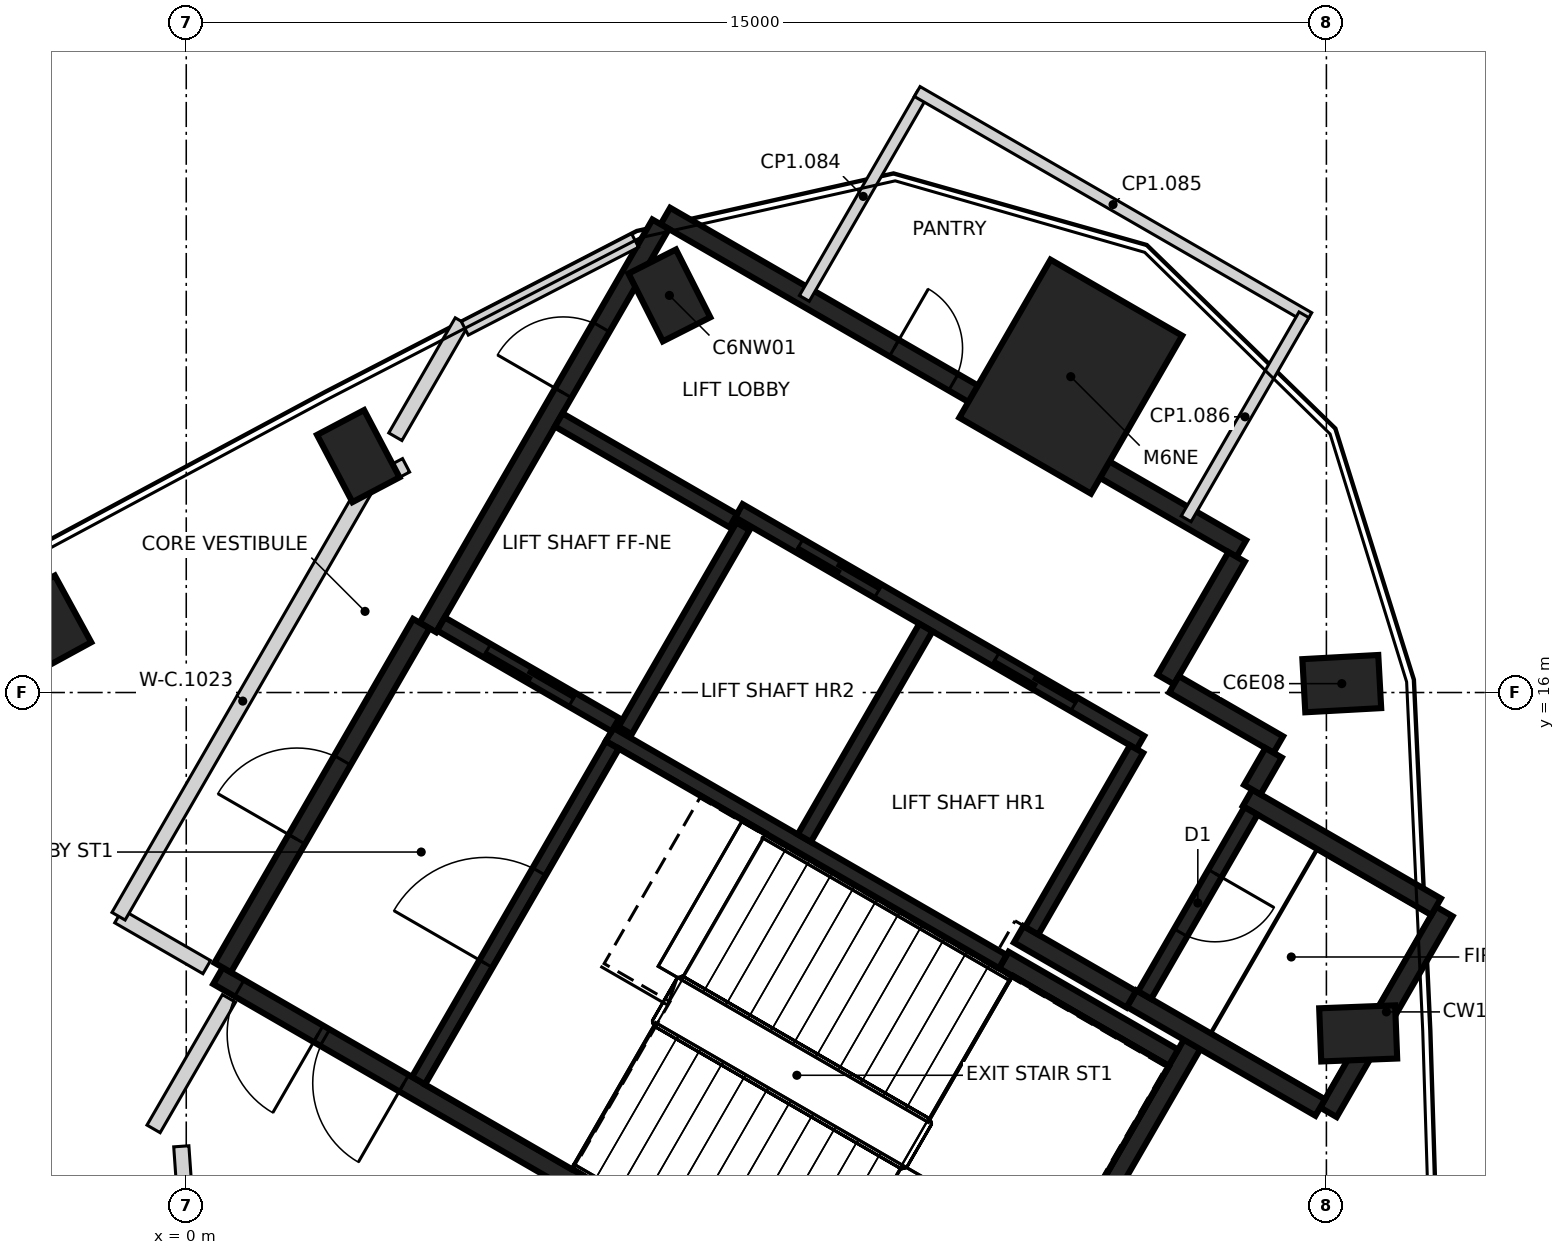
"""IFC4 building model, lengths in metres.
Left out: names, types, materials, properties, quantities, classifications, styles, units other than length and angle.
Written with IfcOpenShell. Run it as: python <this file> out.ifc"""

import sys

from ifc_helpers import new_model, si_unit, direction, frame, frame_2d, origin, origin_2d, place, context, subcontext, project, spatial, rectangle, extrude, element, fill, save


model = new_model("IFC4")
c1 = context("Model", 3, precision=1e-05, world=origin(), true_north=direction((0.0, 1.0)))
c2 = subcontext(c1, "Body", "Model", "MODEL_VIEW")
j1 = project(units=[si_unit("LENGTHUNIT", "METRE"), si_unit("PLANEANGLEUNIT", "RADIAN")], contexts=[c1])
p1 = place(None, origin())
s1 = spatial("IfcSite", under=j1, at=p1, CompositionType="ELEMENT")
p2 = place(p1, origin())
s2 = spatial("IfcBuilding", under=s1, at=p2, CompositionType="ELEMENT")
p3 = place(p2, frame((0.0, 0.0, 283.8)))
s3 = spatial("IfcBuildingStorey", under=s2, at=p3, CompositionType="ELEMENT", Elevation=283.8)
for number, where, z_axis, x_axis in (
    (1, (15.418, 11.515, -0.35), (0.0, 0.0, 1.0), (0.999, 0.039, 0.0)),
    (2, (15.202, 16.117, -0.35), (0.0, 0.0, 1.0), (0.998, 0.055, 0.0)),
    (3, (6.356, 21.224, -0.35), (0.0, 0.0, 1.0), (-0.452, 0.892, 0.0)),
    (4, (2.263, 19.11, -0.35), (0.0, 0.0, 1.0), (-0.466, 0.885, 0.0)),
    (5, (-1.797, 16.932, -0.35), (0.0, 0.0, 1.0), (-0.479, 0.878, 0.0)),
):
    element("IfcColumn", number, at=place(p3, frame(where, z_axis=z_axis, x_axis=x_axis)), inside=s3, PredefinedType="COLUMN", context=c2, shape_type="SweptSolid", body=[
        extrude(rectangle(XDim=1.0, YDim=0.7, at=origin_2d()), origin(), (0.0, 0.0, 1.0), 7.2),
    ])
p4 = place(p3, frame((11.637, 20.155, -0.35), z_axis=(0.0, 0.0, 1.0), x_axis=(0.5, 0.866025403784, 0.0)))
e6 = element("IfcColumn", 6, at=p4, inside=s3, PredefinedType="COLUMN", context=c2, shape_type="SweptSolid", body=[
    extrude(rectangle(XDim=2.4, YDim=2.0, at=origin_2d()), origin(), (0.0, 0.0, 1.0), 7.2),
])
p5 = place(p3, frame((10.42, 6.498, 0.0), z_axis=(0.0, 0.0, 1.0), x_axis=(-0.866021906294, 0.500006057782, 0.0)))
e7 = element("IfcWall", 7, at=p5, inside=s3, PredefinedType="SHEAR", context=c2, shape_type="SweptSolid", body=[
    extrude(rectangle(XDim=11.55, YDim=0.25, at=frame_2d((5.775, 0.0))), origin(), (0.0, 0.0, 1.0), 6.85),
])
p6 = place(p5, frame((10.025, 0.0, 0.0)))
e8 = element("IfcOpeningElement", 8, at=p6, cuts=e7, PredefinedType="OPENING", context=c2, shape_type="SweptSolid", body=[
    extrude(rectangle(XDim=1.2, YDim=2.1, at=frame_2d((0.6, 1.05))), frame((0.0, 0.135, 0.0), z_axis=(0.0, -1.0, 0.0), x_axis=(1.0, 0.0, 0.0)), (0.0, 0.0, 1.0), 0.27),
])
p7 = place(p5, frame((8.725, 0.0, 0.0)))
e9 = element("IfcOpeningElement", 9, at=p7, cuts=e7, PredefinedType="OPENING", context=c2, shape_type="SweptSolid", body=[
    extrude(rectangle(XDim=1.2, YDim=2.1, at=frame_2d((0.6, 1.05))), frame((0.0, 0.135, 0.0), z_axis=(0.0, -1.0, 0.0), x_axis=(1.0, 0.0, 0.0)), (0.0, 0.0, 1.0), 0.27),
])
p8 = place(p3, frame((6.304, 22.269, 0.0), z_axis=(0.0, 0.0, 1.0), x_axis=(0.866022959057, -0.500004234368, 0.0)))
e10 = element("IfcWall", 10, at=p8, inside=s3, PredefinedType="SHEAR", context=c2, shape_type="SweptSolid", body=[
    extrude(rectangle(XDim=8.75, YDim=0.25, at=frame_2d((4.375, 0.0))), origin(), (0.0, 0.0, 1.0), 6.85),
])
p9 = place(p8, frame((3.475, 0.0, 0.0)))
e11 = element("IfcOpeningElement", 11, at=p9, cuts=e10, PredefinedType="OPENING", context=c2, shape_type="SweptSolid", body=[
    extrude(rectangle(XDim=0.9, YDim=2.1, at=frame_2d((0.45, 1.05))), frame((0.0, 0.135, 0.0), z_axis=(0.0, -1.0, 0.0), x_axis=(1.0, 0.0, 0.0)), (0.0, 0.0, 1.0), 0.27),
])
p10 = place(p3, frame((3.179, 16.856, 0.0), z_axis=(0.0, 0.0, 1.0), x_axis=(0.500001955336, 0.866024274868, 0.0)))
e12 = element("IfcWall", 12, at=p10, inside=s3, PredefinedType="SHEAR", context=c2, shape_type="SweptSolid", body=[
    extrude(rectangle(XDim=6.125, YDim=0.25, at=frame_2d((3.062, 0.0))), origin(), (0.0, 0.0, 1.0), 6.85),
])
p11 = place(p10, frame((3.563, 0.0, 0.0)))
e13 = element("IfcOpeningElement", 13, at=p11, cuts=e12, PredefinedType="OPENING", context=c2, shape_type="SweptSolid", body=[
    extrude(rectangle(XDim=1.0, YDim=2.1, at=frame_2d((0.5, 1.05))), frame((0.0, 0.135, 0.0), z_axis=(0.0, -1.0, 0.0), x_axis=(1.0, 0.0, 0.0)), (0.0, 0.0, 1.0), 0.27),
])
p12 = place(p3, frame((0.48, 12.381, 0.0), z_axis=(0.0, 0.0, 1.0), x_axis=(0.49999885962, 0.866026062182, 0.0)))
e14 = element("IfcWall", 14, at=p12, inside=s3, PredefinedType="SHEAR", context=c2, shape_type="SweptSolid", body=[
    extrude(rectangle(XDim=5.225, YDim=0.25, at=frame_2d((2.612, 0.0))), origin(), (0.0, 0.0, 1.0), 6.85),
])
p13 = place(p12, frame((1.949, 0.0, 0.0)))
e15 = element("IfcOpeningElement", 15, at=p13, cuts=e14, PredefinedType="OPENING", context=c2, shape_type="SweptSolid", body=[
    extrude(rectangle(XDim=1.2, YDim=2.1, at=frame_2d((0.6, 1.05))), frame((0.0, 0.135, 0.0), z_axis=(0.0, -1.0, 0.0), x_axis=(1.0, 0.0, 0.0)), (0.0, 0.0, 1.0), 0.27),
])
p14 = place(p3, frame((13.238, 11.378, 0.0), z_axis=(0.0, 0.0, 1.0), x_axis=(-0.500008851346, -0.866020293397, 0.0)))
e16 = element("IfcWall", 16, at=p14, inside=s3, PredefinedType="SHEAR", context=c2, shape_type="SweptSolid", body=[
    extrude(rectangle(XDim=5.51, YDim=0.25, at=frame_2d((2.755, 0.0))), origin(), (0.0, 0.0, 1.0), 6.85),
])
p15 = place(p3, frame((16.552, 13.119, 0.0), z_axis=(0.0, 0.0, 1.0), x_axis=(-0.499978833458, -0.866037623948, 0.0)))
e17 = element("IfcWall", 17, at=p15, inside=s3, PredefinedType="SHEAR", context=c2, shape_type="SweptSolid", body=[
    extrude(rectangle(XDim=3.05, YDim=0.25, at=frame_2d((1.525, 0.0))), origin(), (0.0, 0.0, 1.0), 6.85),
])
p16 = place(p3, frame((14.918, 10.54, 0.0), z_axis=(0.0, 0.0, 1.0), x_axis=(-0.866063538972, 0.499933942099, 0.0)))
e18 = element("IfcWall", 18, at=p16, inside=s3, PredefinedType="SHEAR", context=c2, shape_type="SweptSolid", body=[
    extrude(rectangle(XDim=2.865, YDim=0.25, at=frame_2d((1.432, 0.0))), origin(), (0.0, 0.0, 1.0), 6.85),
])
p17 = place(p3, frame((13.963, 14.614, 0.0), z_axis=(0.0, 0.0, 1.0), x_axis=(0.866042235819, -0.499970844928, 0.0)))
e19 = element("IfcWall", 19, at=p17, inside=s3, PredefinedType="SHEAR", context=c2, shape_type="SweptSolid", body=[
    extrude(rectangle(XDim=2.865, YDim=0.25, at=frame_2d((1.432, 0.0))), origin(), (0.0, 0.0, 1.0), 6.85),
])
p18 = place(p3, frame((10.757, 12.481, 0.0), z_axis=(0.0, 0.0, 1.0), x_axis=(0.866022940537, -0.500004266446, 0.0)))
e20 = element("IfcWall", 20, at=p18, inside=s3, PredefinedType="SHEAR", context=c2, shape_type="SweptSolid", body=[
    extrude(rectangle(XDim=2.575, YDim=0.25, at=frame_2d((1.287, 0.0))), origin(), (0.0, 0.0, 1.0), 6.85),
])
p19 = place(p3, frame((13.819, 17.785, 0.0), z_axis=(0.0, 0.0, 1.0), x_axis=(-0.500039802285, -0.866002422705, 0.0)))
e21 = element("IfcWall", 21, at=p19, inside=s3, PredefinedType="SHEAR", context=c2, shape_type="SweptSolid", body=[
    extrude(rectangle(XDim=1.865, YDim=0.25, at=frame_2d((0.932, 0.0))), origin(), (0.0, 0.0, 1.0), 6.85),
])
p20 = place(p3, frame((12.433, 11.964, 0.0), z_axis=(0.0, 0.0, 1.0), x_axis=(-0.866038183914, 0.499977863513, 0.0)))
e22 = element("IfcWall", 22, at=p20, inside=s3, PredefinedType="SHEAR", context=c2, shape_type="SweptSolid", body=[
    extrude(rectangle(XDim=1.71, YDim=0.25, at=frame_2d((0.855, 0.0))), origin(), (0.0, 0.0, 1.0), 6.85),
])
p21 = place(p3, frame((12.995, 16.108, 0.0), z_axis=(0.0, 0.0, 1.0), x_axis=(0.866044474677, -0.49996696679, 0.0)))
e23 = element("IfcWall", 23, at=p21, inside=s3, PredefinedType="SHEAR", context=c2, shape_type="SweptSolid", body=[
    extrude(rectangle(XDim=1.584, YDim=0.25, at=frame_2d((0.792, 0.0))), origin(), (0.0, 0.0, 1.0), 6.85),
])
p22 = place(p3, frame((14.305, 15.207, 0.0), z_axis=(0.0, 0.0, 1.0), x_axis=(-0.499848422343, -0.866112899501, 0.0)))
e24 = element("IfcWall", 24, at=p22, inside=s3, PredefinedType="SHEAR", context=c2, shape_type="SweptSolid", body=[
    extrude(rectangle(XDim=0.559, YDim=0.25, at=frame_2d((0.28, 0.0))), origin(), (0.0, 0.0, 1.0), 6.85),
])
p23 = place(p3, frame((12.552, 15.342, 0.0), z_axis=(0.0, 0.0, 1.0), x_axis=(-0.866030299012, 0.499991521122, 0.0)))
e25 = element("IfcWall", 25, at=p23, inside=s3, PredefinedType="SHEAR", context=c2, shape_type="SweptSolid", body=[
    extrude(rectangle(XDim=6.1, YDim=0.2, at=frame_2d((3.05, 0.0))), origin(), (0.0, 0.0, 1.0), 6.85),
])
p24 = place(p23, frame((1.0, 0.0, 0.0)))
e26 = element("IfcOpeningElement", 26, at=p24, cuts=e25, PredefinedType="OPENING", context=c2, shape_type="SweptSolid", body=[
    extrude(rectangle(XDim=1.2, YDim=2.1, at=frame_2d((0.6, 1.05))), frame((0.0, 0.11, 0.0), z_axis=(0.0, -1.0, 0.0), x_axis=(1.0, 0.0, 0.0)), (0.0, 0.0, 1.0), 0.22),
])
p25 = place(p23, frame((3.982, 0.0, 0.0)))
e27 = element("IfcOpeningElement", 27, at=p25, cuts=e25, PredefinedType="OPENING", context=c2, shape_type="SweptSolid", body=[
    extrude(rectangle(XDim=1.2, YDim=2.1, at=frame_2d((0.6, 1.05))), frame((0.0, 0.11, 0.0), z_axis=(0.0, -1.0, 0.0), x_axis=(1.0, 0.0, 0.0)), (0.0, 0.0, 1.0), 0.22),
])
p26 = place(p3, frame((10.743, 12.46, 0.0), z_axis=(0.0, 0.0, 1.0), x_axis=(-0.866018848283, 0.500011354289, 0.0)))
e28 = element("IfcWall", 28, at=p26, inside=s3, PredefinedType="SHEAR", context=c2, shape_type="SweptSolid", body=[
    extrude(rectangle(XDim=5.974, YDim=0.2, at=frame_2d((2.987, 0.0))), origin(), (0.0, 0.0, 1.0), 6.85),
])
p27 = place(p3, frame((3.057, 10.895, 0.0), z_axis=(0.0, 0.0, 1.0), x_axis=(0.500027839223, 0.866009330205, 0.0)))
e29 = element("IfcWall", 29, at=p27, inside=s3, PredefinedType="SHEAR", context=c2, shape_type="SweptSolid", body=[
    extrude(rectangle(XDim=5.098, YDim=0.2, at=frame_2d((2.549, 0.0))), origin(), (0.0, 0.0, 1.0), 6.85),
])
p28 = place(p27, frame((1.774, 0.0, 0.0)))
e30 = element("IfcOpeningElement", 30, at=p28, cuts=e29, PredefinedType="OPENING", context=c2, shape_type="SweptSolid", body=[
    extrude(rectangle(XDim=1.4, YDim=2.1, at=frame_2d((0.7, 1.05))), frame((0.0, 0.11, 0.0), z_axis=(0.0, -1.0, 0.0), x_axis=(1.0, 0.0, 0.0)), (0.0, 0.0, 1.0), 0.22),
])
p29 = place(p3, frame((8.132, 14.084, 0.0), z_axis=(0.0, 0.0, 1.0), x_axis=(0.500030834389, 0.86600760081, 0.0)))
e31 = element("IfcWall", 31, at=p29, inside=s3, PredefinedType="SHEAR", context=c2, shape_type="SweptSolid", body=[
    extrude(rectangle(XDim=3.198, YDim=0.2, at=frame_2d((1.599, 0.0))), origin(), (0.0, 0.0, 1.0), 6.85),
])
p30 = place(p3, frame((14.008, 14.442, 0.0), z_axis=(0.0, 0.0, 1.0), x_axis=(-0.499986818241, -0.866033014143, 0.0)))
e32 = element("IfcWall", 32, at=p30, inside=s3, PredefinedType="SHEAR", context=c2, shape_type="SweptSolid", body=[
    extrude(rectangle(XDim=2.798, YDim=0.2, at=frame_2d((1.399, 0.0))), origin(), (0.0, 0.0, 1.0), 6.85),
])
p31 = place(p30, frame((0.949, 0.0, 0.0)))
e33 = element("IfcOpeningElement", 33, at=p31, cuts=e32, PredefinedType="OPENING", context=c2, shape_type="SweptSolid", body=[
    extrude(rectangle(XDim=0.9, YDim=2.1, at=frame_2d((0.45, 1.05))), frame((0.0, 0.11, 0.0), z_axis=(0.0, -1.0, 0.0), x_axis=(1.0, 0.0, 0.0)), (0.0, 0.0, 1.0), 0.22),
])
p32 = place(p3, frame((12.502, 15.255, 0.0), z_axis=(0.0, 0.0, 1.0), x_axis=(-0.499965018551, -0.866045599391, 0.0)))
e34 = element("IfcWall", 34, at=p32, inside=s3, PredefinedType="SHEAR", context=c2, shape_type="SweptSolid", body=[
    extrude(rectangle(XDim=2.759, YDim=0.2, at=frame_2d((1.379, 0.0))), origin(), (0.0, 0.0, 1.0), 6.85),
])
p33 = place(p3, frame((7.324, 18.187, 0.0), z_axis=(0.0, 0.0, 1.0), x_axis=(-0.499967891604, -0.866043940782, 0.0)))
e35 = element("IfcWall", 35, at=p33, inside=s3, PredefinedType="SHEAR", context=c2, shape_type="SweptSolid", body=[
    extrude(rectangle(XDim=3.1, YDim=0.2, at=frame_2d((1.55, 0.0))), origin(), (0.0, 0.0, 1.0), 6.85),
])
p34 = place(p3, frame((5.646, 15.576, 0.0), z_axis=(0.0, 0.0, 1.0), x_axis=(-0.866018407898, 0.500012117035, 0.0)))
e36 = element("IfcWall", 36, at=p34, inside=s3, PredefinedType="SHEAR", context=c2, shape_type="SweptSolid", body=[
    extrude(rectangle(XDim=2.651, YDim=0.2, at=frame_2d((1.325, 0.0))), origin(), (0.0, 0.0, 1.0), 6.85),
])
p35 = place(p34, frame((0.652, 0.0, 0.0)))
e37 = element("IfcOpeningElement", 37, at=p35, cuts=e36, PredefinedType="OPENING", context=c2, shape_type="SweptSolid", body=[
    extrude(rectangle(XDim=1.3, YDim=2.1, at=frame_2d((0.65, 1.05))), frame((0.0, 0.11, 0.0), z_axis=(0.0, -1.0, 0.0), x_axis=(1.0, 0.0, 0.0)), (0.0, 0.0, 1.0), 0.22),
])
p36 = place(p3, frame((7.196, 18.26, 0.0), z_axis=(0.0, 0.0, 1.0), x_axis=(-0.866018407898, 0.500012117035, 0.0)))
e38 = element("IfcWall", 38, at=p36, inside=s3, PredefinedType="SHEAR", context=c2, shape_type="SweptSolid", body=[
    extrude(rectangle(XDim=2.651, YDim=0.2, at=frame_2d((1.325, 0.0))), origin(), (0.0, 0.0, 1.0), 6.85),
])
p37 = place(p3, frame((8.132, 21.185, 0.0), z_axis=(0.0, 0.0, 1.0), x_axis=(0.49999285859, 0.86602952684, 0.0)))
e39 = element("IfcWall", 39, at=p37, inside=s3, PredefinedType="PARTITIONING", context=c2, shape_type="SweptSolid", body=[
    extrude(rectangle(XDim=3.1, YDim=0.15, at=frame_2d((1.55, 0.0))), origin(), (0.0, 0.0, 1.0), 6.85),
])
p38 = place(p3, frame((9.617, 23.907, 0.0), z_axis=(0.0, 0.0, 1.0), x_axis=(0.866045517703, -0.499965160052, 0.0)))
e40 = element("IfcWall", 40, at=p38, inside=s3, PredefinedType="PARTITIONING", context=c2, shape_type="SweptSolid", body=[
    extrude(rectangle(XDim=5.95, YDim=0.15, at=frame_2d((2.975, 0.0))), origin(), (0.0, 0.0, 1.0), 6.85),
])
p39 = place(p3, frame((14.705, 20.969, 0.0), z_axis=(0.0, 0.0, 1.0), x_axis=(-0.499967891604, -0.866043940782, 0.0)))
e41 = element("IfcWall", 41, at=p39, inside=s3, PredefinedType="PARTITIONING", context=c2, shape_type="SweptSolid", body=[
    extrude(rectangle(XDim=3.1, YDim=0.15, at=frame_2d((1.55, 0.0))), origin(), (0.0, 0.0, 1.0), 6.85),
])
p40 = place(p3, frame((-0.891, 13.057, 0.0), z_axis=(0.0, 0.0, 1.0), x_axis=(0.866082447003, -0.499901185229, 0.0)))
e42 = element("IfcWall", 42, at=p40, inside=s3, PredefinedType="PARTITIONING", context=c2, shape_type="SweptSolid", body=[
    extrude(rectangle(XDim=1.34, YDim=0.2, at=frame_2d((0.67, 0.0))), origin(), (0.0, 0.0, 1.0), 6.85),
])
p41 = place(p3, frame((-0.891, 13.057, 0.0), z_axis=(0.0, 0.0, 1.0), x_axis=(0.499999420379, 0.866025738428, 0.0)))
e43 = element("IfcWall", 43, at=p41, inside=s3, PredefinedType="PARTITIONING", context=c2, shape_type="SweptSolid", body=[
    extrude(rectangle(XDim=6.537, YDim=0.2, at=frame_2d((3.268, 0.0))), origin(), (0.0, 0.0, 1.0), 6.85),
])
p42 = place(p3, frame((-0.43, 10.259, 0.0), z_axis=(0.0, 0.0, 1.0), x_axis=(0.500429403118, 0.865777345797, 0.0)))
e44 = element("IfcWall", 44, at=p42, inside=s3, PredefinedType="PARTITIONING", context=c2, shape_type="SweptSolid", body=[
    extrude(rectangle(XDim=1.983, YDim=0.2, at=frame_2d((0.991, 0.0))), origin(), (0.0, 0.0, 1.0), 6.85),
])
p43 = place(p3, frame((-0.065, 10.03, 0.0), z_axis=(0.0, 0.0, 1.0), x_axis=(0.070396260623, -0.997519105827, 0.0)))
e45 = element("IfcWall", 45, at=p43, inside=s3, PredefinedType="PARTITIONING", context=c2, shape_type="SweptSolid", body=[
    extrude(rectangle(XDim=2.386, YDim=0.2, at=frame_2d((1.193, 0.0))), origin(), (0.0, 0.0, 1.0), 6.85),
])
p44 = place(p3, frame((2.377, 18.718, 0.0), z_axis=(0.0, 0.0, 1.0), x_axis=(0.885009189366, 0.465573554595, 0.0)))
e46 = element("IfcWall", 46, at=p44, inside=s3, PredefinedType="PARTITIONING", context=c2, shape_type="SweptSolid", body=[
    extrude(rectangle(XDim=0.582, YDim=0.2, at=frame_2d((0.291, 0.0))), origin(), (0.0, 0.0, 1.0), 6.85),
])
p45 = place(p3, frame((2.751, 19.365, 0.0), z_axis=(0.0, 0.0, 1.0), x_axis=(0.499952011761, 0.866053108034, 0.0)))
e47 = element("IfcWall", 47, at=p45, inside=s3, PredefinedType="PARTITIONING", context=c2, shape_type="SweptSolid", body=[
    extrude(rectangle(XDim=1.749, YDim=0.2, at=frame_2d((0.875, 0.0))), origin(), (0.0, 0.0, 1.0), 5.95),
])
p46 = place(p3, frame((3.665, 20.791, 0.0), z_axis=(0.0, 0.0, 1.0), x_axis=(0.8885404224, 0.458798341063, 0.0)))
e48 = element("IfcWall", 48, at=p46, inside=s3, PredefinedType="PARTITIONING", context=c2, shape_type="SweptSolid", body=[
    extrude(rectangle(XDim=2.521, YDim=0.2, at=frame_2d((1.26, 0.0))), origin(), (0.0, 0.0, 1.0), 6.85),
])
p47 = place(p35, origin())
e49 = element("IfcDoor", 49, at=p47, inside=s3, OperationType="SLIDING_TO_RIGHT", PredefinedType="DOOR", context=c2, shape_type="SweptSolid", body=[
    extrude(rectangle(XDim=1.3, YDim=2.1, at=frame_2d((0.65, 1.05))), frame((0.0, 0.025, 0.0), z_axis=(0.0, -1.0, 0.0), x_axis=(1.0, 0.0, 0.0)), (0.0, 0.0, 1.0), 0.05),
])
fill(e37, e49)
p48 = place(p24, origin())
e50 = element("IfcDoor", 50, at=p48, inside=s3, OperationType="DOUBLE_DOOR_SLIDING", PredefinedType="DOOR", context=c2, shape_type="SweptSolid", body=[
    extrude(rectangle(XDim=1.2, YDim=2.1, at=frame_2d((0.6, 1.05))), frame((0.0, 0.025, 0.0), z_axis=(0.0, -1.0, 0.0), x_axis=(1.0, 0.0, 0.0)), (0.0, 0.0, 1.0), 0.05),
])
fill(e26, e50)
p49 = place(p25, origin())
e51 = element("IfcDoor", 51, at=p49, inside=s3, OperationType="DOUBLE_DOOR_SLIDING", PredefinedType="DOOR", context=c2, shape_type="SweptSolid", body=[
    extrude(rectangle(XDim=1.2, YDim=2.1, at=frame_2d((0.6, 1.05))), frame((0.0, 0.025, 0.0), z_axis=(0.0, -1.0, 0.0), x_axis=(1.0, 0.0, 0.0)), (0.0, 0.0, 1.0), 0.05),
])
fill(e27, e51)
p50 = place(p11, origin())
e52 = element("IfcDoor", 52, at=p50, inside=s3, OperationType="SINGLE_SWING_LEFT", PredefinedType="DOOR", context=c2, shape_type="SweptSolid", body=[
    extrude(rectangle(XDim=1.0, YDim=2.1, at=frame_2d((0.5, 1.05))), frame((0.0, 0.025, 0.0), z_axis=(0.0, -1.0, 0.0), x_axis=(1.0, 0.0, 0.0)), (0.0, 0.0, 1.0), 0.05),
])
fill(e13, e52)
p51 = place(p6, origin())
e53 = element("IfcDoor", 53, at=p51, inside=s3, OperationType="SINGLE_SWING_LEFT", PredefinedType="DOOR", context=c2, shape_type="SweptSolid", body=[
    extrude(rectangle(XDim=1.2, YDim=2.1, at=frame_2d((0.6, 1.05))), frame((0.0, 0.025, 0.0), z_axis=(0.0, -1.0, 0.0), x_axis=(1.0, 0.0, 0.0)), (0.0, 0.0, 1.0), 0.05),
])
fill(e8, e53)
p52 = place(p7, origin())
e54 = element("IfcDoor", 54, at=p52, inside=s3, OperationType="SINGLE_SWING_RIGHT", PredefinedType="DOOR", context=c2, shape_type="SweptSolid", body=[
    extrude(rectangle(XDim=1.2, YDim=2.1, at=frame_2d((0.6, 1.05))), frame((0.0, 0.025, 0.0), z_axis=(0.0, -1.0, 0.0), x_axis=(1.0, 0.0, 0.0)), (0.0, 0.0, 1.0), 0.05),
])
fill(e9, e54)
p53 = place(p13, origin())
e55 = element("IfcDoor", 55, at=p53, inside=s3, OperationType="SINGLE_SWING_LEFT", PredefinedType="DOOR", context=c2, shape_type="SweptSolid", body=[
    extrude(rectangle(XDim=1.2, YDim=2.1, at=frame_2d((0.6, 1.05))), frame((0.0, 0.025, 0.0), z_axis=(0.0, -1.0, 0.0), x_axis=(1.0, 0.0, 0.0)), (0.0, 0.0, 1.0), 0.05),
])
fill(e15, e55)
p54 = place(p28, origin())
e56 = element("IfcDoor", 56, at=p54, inside=s3, OperationType="SINGLE_SWING_LEFT", PredefinedType="DOOR", context=c2, shape_type="SweptSolid", body=[
    extrude(rectangle(XDim=1.4, YDim=2.1, at=frame_2d((0.7, 1.05))), frame((0.0, 0.025, 0.0), z_axis=(0.0, -1.0, 0.0), x_axis=(1.0, 0.0, 0.0)), (0.0, 0.0, 1.0), 0.05),
])
fill(e30, e56)
p55 = place(p31, origin())
e57 = element("IfcDoor", 57, at=p55, inside=s3, OperationType="SINGLE_SWING_RIGHT", PredefinedType="DOOR", context=c2, shape_type="SweptSolid", body=[
    extrude(rectangle(XDim=0.9, YDim=2.1, at=frame_2d((0.45, 1.05))), frame((0.0, 0.025, 0.0), z_axis=(0.0, -1.0, 0.0), x_axis=(1.0, 0.0, 0.0)), (0.0, 0.0, 1.0), 0.05),
])
fill(e33, e57)
p56 = place(p9, origin())
e58 = element("IfcDoor", 58, at=p56, inside=s3, OperationType="SINGLE_SWING_LEFT", PredefinedType="DOOR", context=c2, shape_type="SweptSolid", body=[
    extrude(rectangle(XDim=0.9, YDim=2.1, at=frame_2d((0.45, 1.05))), frame((0.0, 0.025, 0.0), z_axis=(0.0, -1.0, 0.0), x_axis=(1.0, 0.0, 0.0)), (0.0, 0.0, 1.0), 0.05),
])
fill(e11, e58)
save(model, sys.argv[1])
